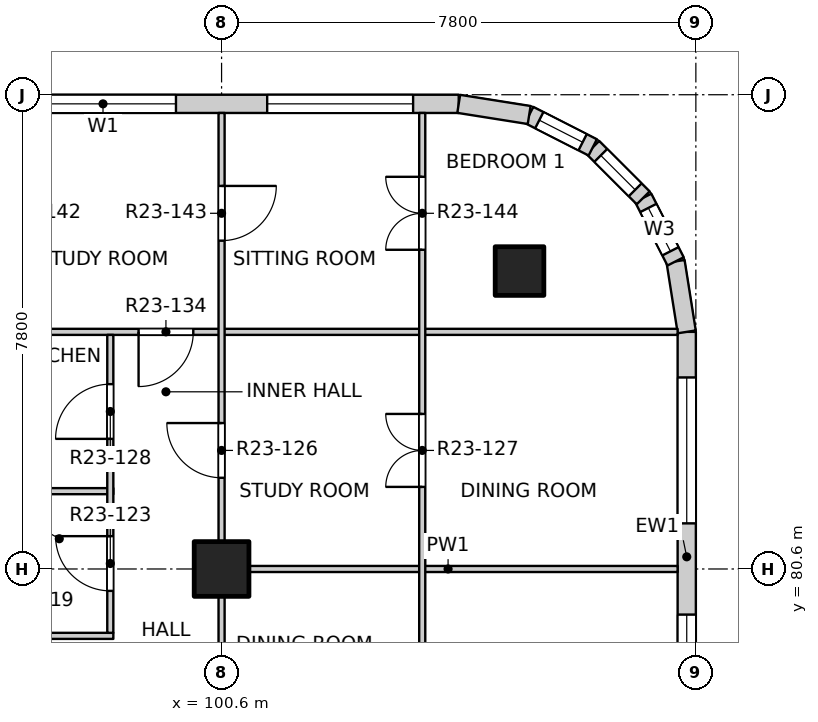
"""IFC4 building model, lengths in metres.
Left out: names, types, materials, properties, quantities, classifications, styles, units other than length and angle.
Written with IfcOpenShell. Run it as: python <this file> out.ifc"""

import sys

from ifc_helpers import new_model, si_unit, direction, frame, frame_2d, origin, origin_2d, place, context, subcontext, project, spatial, rectangle, extrude, element, fill, save


model = new_model("IFC4")
c1 = context("Model", 3, precision=1e-05, world=origin(), true_north=direction((0.0, 1.0)))
c2 = subcontext(c1, "Body", "Model", "MODEL_VIEW")
j1 = project(units=[si_unit("LENGTHUNIT", "METRE"), si_unit("PLANEANGLEUNIT", "RADIAN")], contexts=[c1])
p1 = place(None, origin())
s1 = spatial("IfcSite", under=j1, at=p1, CompositionType="ELEMENT")
p2 = place(p1, origin())
s2 = spatial("IfcBuilding", under=s1, at=p2, CompositionType="ELEMENT")
p3 = place(p2, frame((0.0, 0.0, 234.7)))
s3 = spatial("IfcBuildingStorey", under=s2, at=p3, CompositionType="ELEMENT", Elevation=234.7)
p4 = place(p3, frame((105.5, 85.5, -0.25), z_axis=(0.0, 0.0, 1.0), x_axis=(1.0, 0.0, 0.0)))
e1 = element("IfcColumn", 1, at=p4, inside=s3, PredefinedType="COLUMN", context=c2, shape_type="SweptSolid", body=[
    extrude(rectangle(XDim=0.8, YDim=0.8, at=origin_2d()), origin(), (0.0, 0.0, 1.0), 3.4),
])
p5 = place(p3, frame((100.6, 80.6, -0.25), z_axis=(0.0, 0.0, 1.0), x_axis=(1.0, 0.0, 0.0)))
e2 = element("IfcColumn", 2, at=p5, inside=s3, PredefinedType="COLUMN", context=c2, shape_type="SweptSolid", body=[
    extrude(rectangle(XDim=0.9, YDim=0.9, at=origin_2d()), origin(), (0.0, 0.0, 1.0), 3.4),
])
p6 = place(p3, frame((108.25, 77.1, 0.0), z_axis=(0.0, 0.0, 1.0), x_axis=(0.0, 1.0, 0.0)))
e3 = element("IfcWall", 3, at=p6, inside=s3, PredefinedType="SOLIDWALL", context=c2, shape_type="SweptSolid", body=[
    extrude(rectangle(XDim=7.4, YDim=0.3, at=frame_2d((3.7, 0.0))), origin(), (0.0, 0.0, 1.0), 2.7),
])
p7 = place(p6, frame((0.35, 0.0, 0.9)))
e4 = element("IfcOpeningElement", 4, at=p7, cuts=e3, PredefinedType="OPENING", context=c2, shape_type="SweptSolid", body=[
    extrude(rectangle(XDim=2.4, YDim=1.8, at=frame_2d((1.2, 0.9))), frame((0.0, 0.16, 0.0), z_axis=(0.0, -1.0, 0.0), x_axis=(1.0, 0.0, 0.0)), (0.0, 0.0, 1.0), 0.32),
])
p8 = place(p6, frame((4.25, 0.0, 0.9)))
e5 = element("IfcOpeningElement", 5, at=p8, cuts=e3, PredefinedType="OPENING", context=c2, shape_type="SweptSolid", body=[
    extrude(rectangle(XDim=2.4, YDim=1.8, at=frame_2d((1.2, 0.9))), frame((0.0, 0.16, 0.0), z_axis=(0.0, -1.0, 0.0), x_axis=(1.0, 0.0, 0.0)), (0.0, 0.0, 1.0), 0.32),
])
p9 = place(p3, frame((97.1, 88.25, 0.0), z_axis=(0.0, 0.0, 1.0), x_axis=(1.0, 0.0, 0.0)))
e6 = element("IfcWall", 6, at=p9, inside=s3, PredefinedType="SOLIDWALL", context=c2, shape_type="SweptSolid", body=[
    extrude(rectangle(XDim=7.4, YDim=0.3, at=frame_2d((3.7, 0.0))), origin(), (0.0, 0.0, 1.0), 2.7),
])
p10 = place(p9, frame((0.35, 0.0, 0.9)))
e7 = element("IfcOpeningElement", 7, at=p10, cuts=e6, PredefinedType="OPENING", context=c2, shape_type="SweptSolid", body=[
    extrude(rectangle(XDim=2.4, YDim=1.8, at=frame_2d((1.2, 0.9))), frame((0.0, 0.16, 0.0), z_axis=(0.0, -1.0, 0.0), x_axis=(1.0, 0.0, 0.0)), (0.0, 0.0, 1.0), 0.32),
])
p11 = place(p9, frame((4.25, 0.0, 0.9)))
e8 = element("IfcOpeningElement", 8, at=p11, cuts=e6, PredefinedType="OPENING", context=c2, shape_type="SweptSolid", body=[
    extrude(rectangle(XDim=2.4, YDim=1.8, at=frame_2d((1.2, 0.9))), frame((0.0, 0.16, 0.0), z_axis=(0.0, -1.0, 0.0), x_axis=(1.0, 0.0, 0.0)), (0.0, 0.0, 1.0), 0.32),
])
p12 = place(p3, frame((108.25, 84.5, 0.0), z_axis=(0.0, 0.0, 1.0), x_axis=(-0.156496880861, 0.987678452879, 0.0)))
e9 = element("IfcWall", 9, at=p12, inside=s3, PredefinedType="SOLIDWALL", context=c2, shape_type="SweptSolid", body=[
    extrude(rectangle(XDim=1.173, YDim=0.3, at=frame_2d((0.586, 0.0))), origin(), (0.0, 0.0, 1.0), 2.7),
])
p13 = place(p3, frame((108.066, 85.659, 0.0), z_axis=(0.0, 0.0, 1.0), x_axis=(-0.454025524128, 0.890988677504, 0.0)))
e10 = element("IfcWall", 10, at=p13, inside=s3, PredefinedType="SOLIDWALL", context=c2, shape_type="SweptSolid", body=[
    extrude(rectangle(XDim=1.173, YDim=0.3, at=frame_2d((0.587, 0.0))), origin(), (0.0, 0.0, 1.0), 2.7),
])
p14 = place(p13, frame((0.187, 0.0, 0.9)))
e11 = element("IfcOpeningElement", 11, at=p14, cuts=e10, PredefinedType="OPENING", context=c2, shape_type="SweptSolid", body=[
    extrude(rectangle(XDim=0.8, YDim=1.2, at=frame_2d((0.4, 0.6))), frame((0.0, 0.16, 0.0), z_axis=(0.0, -1.0, 0.0), x_axis=(1.0, 0.0, 0.0)), (0.0, 0.0, 1.0), 0.32),
])
p15 = place(p3, frame((107.534, 86.704, 0.0), z_axis=(0.0, 0.0, 1.0), x_axis=(-0.707106781187, 0.707106781187, 0.0)))
e12 = element("IfcWall", 12, at=p15, inside=s3, PredefinedType="SOLIDWALL", context=c2, shape_type="SweptSolid", body=[
    extrude(rectangle(XDim=1.173, YDim=0.3, at=frame_2d((0.586, 0.0))), origin(), (0.0, 0.0, 1.0), 2.7),
])
p16 = place(p15, frame((0.187, 0.0, 0.9)))
e13 = element("IfcOpeningElement", 13, at=p16, cuts=e12, PredefinedType="OPENING", context=c2, shape_type="SweptSolid", body=[
    extrude(rectangle(XDim=0.8, YDim=1.2, at=frame_2d((0.4, 0.6))), frame((0.0, 0.16, 0.0), z_axis=(0.0, -1.0, 0.0), x_axis=(1.0, 0.0, 0.0)), (0.0, 0.0, 1.0), 0.32),
])
p17 = place(p3, frame((106.704, 87.534, 0.0), z_axis=(0.0, 0.0, 1.0), x_axis=(-0.890988677504, 0.454025524128, 0.0)))
e14 = element("IfcWall", 14, at=p17, inside=s3, PredefinedType="SOLIDWALL", context=c2, shape_type="SweptSolid", body=[
    extrude(rectangle(XDim=1.173, YDim=0.3, at=frame_2d((0.587, 0.0))), origin(), (0.0, 0.0, 1.0), 2.7),
])
p18 = place(p17, frame((0.187, 0.0, 0.9)))
e15 = element("IfcOpeningElement", 15, at=p18, cuts=e14, PredefinedType="OPENING", context=c2, shape_type="SweptSolid", body=[
    extrude(rectangle(XDim=0.8, YDim=1.2, at=frame_2d((0.4, 0.6))), frame((0.0, 0.16, 0.0), z_axis=(0.0, -1.0, 0.0), x_axis=(1.0, 0.0, 0.0)), (0.0, 0.0, 1.0), 0.32),
])
p19 = place(p3, frame((105.659, 88.066, 0.0), z_axis=(0.0, 0.0, 1.0), x_axis=(-0.987678452879, 0.156496880861, 0.0)))
e16 = element("IfcWall", 16, at=p19, inside=s3, PredefinedType="SOLIDWALL", context=c2, shape_type="SweptSolid", body=[
    extrude(rectangle(XDim=1.173, YDim=0.3, at=frame_2d((0.586, 0.0))), origin(), (0.0, 0.0, 1.0), 2.7),
])
p20 = place(p3, frame((96.6, 79.5, 0.0), z_axis=(0.0, 0.0, 1.0), x_axis=(1.0, 0.0, 0.0)))
e17 = element("IfcWall", 17, at=p20, inside=s3, PredefinedType="PARTITIONING", context=c2, shape_type="SweptSolid", body=[
    extrude(rectangle(XDim=2.22, YDim=0.1, at=frame_2d((1.11, 0.0))), origin(), (0.0, 0.0, 1.0), 3.15),
])
p21 = place(p3, frame((100.55, 80.6, 0.0), z_axis=(0.0, 0.0, 1.0), x_axis=(1.0, 0.0, 0.0)))
e18 = element("IfcWall", 18, at=p21, inside=s3, PredefinedType="PARTITIONING", context=c2, shape_type="SweptSolid", body=[
    extrude(rectangle(XDim=7.55, YDim=0.1, at=frame_2d((3.775, 0.0))), origin(), (0.0, 0.0, 1.0), 3.15),
])
p22 = place(p3, frame((96.6, 81.88, 0.0), z_axis=(0.0, 0.0, 1.0), x_axis=(1.0, 0.0, 0.0)))
e19 = element("IfcWall", 19, at=p22, inside=s3, PredefinedType="PARTITIONING", context=c2, shape_type="SweptSolid", body=[
    extrude(rectangle(XDim=2.22, YDim=0.1, at=frame_2d((1.11, 0.0))), origin(), (0.0, 0.0, 1.0), 3.15),
])
p23 = place(p3, frame((96.6, 84.5, 0.0), z_axis=(0.0, 0.0, 1.0), x_axis=(1.0, 0.0, 0.0)))
e20 = element("IfcWall", 20, at=p23, inside=s3, PredefinedType="PARTITIONING", context=c2, shape_type="SweptSolid", body=[
    extrude(rectangle(XDim=11.5, YDim=0.1, at=frame_2d((5.75, 0.0))), origin(), (0.0, 0.0, 1.0), 3.15),
])
p24 = place(p23, frame((2.635, 0.0, 0.0)))
e21 = element("IfcOpeningElement", 21, at=p24, cuts=e20, PredefinedType="OPENING", context=c2, shape_type="SweptSolid", body=[
    extrude(rectangle(XDim=0.9, YDim=2.1, at=frame_2d((0.45, 1.05))), frame((0.0, 0.06, 0.0), z_axis=(0.0, -1.0, 0.0), x_axis=(1.0, 0.0, 0.0)), (0.0, 0.0, 1.0), 0.12),
])
p25 = place(p3, frame((98.77, 79.55, 0.0), z_axis=(0.0, 0.0, 1.0), x_axis=(0.0, 1.0, 0.0)))
e22 = element("IfcWall", 22, at=p25, inside=s3, PredefinedType="PARTITIONING", context=c2, shape_type="SweptSolid", body=[
    extrude(rectangle(XDim=4.9, YDim=0.1, at=frame_2d((2.45, 0.0))), origin(), (0.0, 0.0, 1.0), 3.15),
])
p26 = place(p25, frame((0.69, 0.0, 0.0)))
e23 = element("IfcOpeningElement", 23, at=p26, cuts=e22, PredefinedType="OPENING", context=c2, shape_type="SweptSolid", body=[
    extrude(rectangle(XDim=0.9, YDim=2.1, at=frame_2d((0.45, 1.05))), frame((0.0, 0.06, 0.0), z_axis=(0.0, -1.0, 0.0), x_axis=(1.0, 0.0, 0.0)), (0.0, 0.0, 1.0), 0.12),
])
p27 = place(p25, frame((3.19, 0.0, 0.0)))
e24 = element("IfcOpeningElement", 24, at=p27, cuts=e22, PredefinedType="OPENING", context=c2, shape_type="SweptSolid", body=[
    extrude(rectangle(XDim=0.9, YDim=2.1, at=frame_2d((0.45, 1.05))), frame((0.0, 0.06, 0.0), z_axis=(0.0, -1.0, 0.0), x_axis=(1.0, 0.0, 0.0)), (0.0, 0.0, 1.0), 0.12),
])
p28 = place(p3, frame((100.6, 41.9, 0.0), z_axis=(0.0, 0.0, 1.0), x_axis=(0.0, 1.0, 0.0)))
e25 = element("IfcWall", 25, at=p28, inside=s3, PredefinedType="PARTITIONING", context=c2, shape_type="SweptSolid", body=[
    extrude(rectangle(XDim=46.2, YDim=0.1, at=frame_2d((23.1, 0.0))), origin(), (0.0, 0.0, 1.0), 3.15),
])
p29 = place(p28, frame((1.2, 0.0, 0.0)))
e26 = element("IfcOpeningElement", 26, at=p29, cuts=e25, PredefinedType="OPENING", context=c2, shape_type="SweptSolid", body=[
    extrude(rectangle(XDim=0.9, YDim=2.1, at=frame_2d((0.45, 1.05))), frame((0.0, 0.06, 0.0), z_axis=(0.0, -1.0, 0.0), x_axis=(1.0, 0.0, 0.0)), (0.0, 0.0, 1.0), 0.12),
])
p30 = place(p28, frame((6.025, 0.0, 0.0)))
e27 = element("IfcOpeningElement", 27, at=p30, cuts=e25, PredefinedType="OPENING", context=c2, shape_type="SweptSolid", body=[
    extrude(rectangle(XDim=0.9, YDim=2.1, at=frame_2d((0.45, 1.05))), frame((0.0, 0.06, 0.0), z_axis=(0.0, -1.0, 0.0), x_axis=(1.0, 0.0, 0.0)), (0.0, 0.0, 1.0), 0.12),
])
p31 = place(p28, frame((9.975, 0.0, 0.0)))
e28 = element("IfcOpeningElement", 28, at=p31, cuts=e25, PredefinedType="OPENING", context=c2, shape_type="SweptSolid", body=[
    extrude(rectangle(XDim=0.9, YDim=2.1, at=frame_2d((0.45, 1.05))), frame((0.0, 0.06, 0.0), z_axis=(0.0, -1.0, 0.0), x_axis=(1.0, 0.0, 0.0)), (0.0, 0.0, 1.0), 0.12),
])
p32 = place(p28, frame((12.9, 0.0, 0.0)))
e29 = element("IfcOpeningElement", 29, at=p32, cuts=e25, PredefinedType="OPENING", context=c2, shape_type="SweptSolid", body=[
    extrude(rectangle(XDim=0.9, YDim=2.1, at=frame_2d((0.45, 1.05))), frame((0.0, 0.06, 0.0), z_axis=(0.0, -1.0, 0.0), x_axis=(1.0, 0.0, 0.0)), (0.0, 0.0, 1.0), 0.12),
])
p33 = place(p28, frame((17.775, 0.0, 0.0)))
e30 = element("IfcOpeningElement", 30, at=p33, cuts=e25, PredefinedType="OPENING", context=c2, shape_type="SweptSolid", body=[
    extrude(rectangle(XDim=0.9, YDim=2.1, at=frame_2d((0.45, 1.05))), frame((0.0, 0.06, 0.0), z_axis=(0.0, -1.0, 0.0), x_axis=(1.0, 0.0, 0.0)), (0.0, 0.0, 1.0), 0.12),
])
p34 = place(p28, frame((21.625, 0.0, 0.0)))
e31 = element("IfcOpeningElement", 31, at=p34, cuts=e25, PredefinedType="OPENING", context=c2, shape_type="SweptSolid", body=[
    extrude(rectangle(XDim=0.9, YDim=2.1, at=frame_2d((0.45, 1.05))), frame((0.0, 0.06, 0.0), z_axis=(0.0, -1.0, 0.0), x_axis=(1.0, 0.0, 0.0)), (0.0, 0.0, 1.0), 0.12),
])
p35 = place(p28, frame((25.575, 0.0, 0.0)))
e32 = element("IfcOpeningElement", 32, at=p35, cuts=e25, PredefinedType="OPENING", context=c2, shape_type="SweptSolid", body=[
    extrude(rectangle(XDim=0.9, YDim=2.1, at=frame_2d((0.45, 1.05))), frame((0.0, 0.06, 0.0), z_axis=(0.0, -1.0, 0.0), x_axis=(1.0, 0.0, 0.0)), (0.0, 0.0, 1.0), 0.12),
])
p36 = place(p28, frame((28.5, 0.0, 0.0)))
e33 = element("IfcOpeningElement", 33, at=p36, cuts=e25, PredefinedType="OPENING", context=c2, shape_type="SweptSolid", body=[
    extrude(rectangle(XDim=0.9, YDim=2.1, at=frame_2d((0.45, 1.05))), frame((0.0, 0.06, 0.0), z_axis=(0.0, -1.0, 0.0), x_axis=(1.0, 0.0, 0.0)), (0.0, 0.0, 1.0), 0.12),
])
p37 = place(p28, frame((33.375, 0.0, 0.0)))
e34 = element("IfcOpeningElement", 34, at=p37, cuts=e25, PredefinedType="OPENING", context=c2, shape_type="SweptSolid", body=[
    extrude(rectangle(XDim=0.9, YDim=2.1, at=frame_2d((0.45, 1.05))), frame((0.0, 0.06, 0.0), z_axis=(0.0, -1.0, 0.0), x_axis=(1.0, 0.0, 0.0)), (0.0, 0.0, 1.0), 0.12),
])
p38 = place(p28, frame((36.3, 0.0, 0.0)))
e35 = element("IfcOpeningElement", 35, at=p38, cuts=e25, PredefinedType="OPENING", context=c2, shape_type="SweptSolid", body=[
    extrude(rectangle(XDim=0.9, YDim=2.1, at=frame_2d((0.45, 1.05))), frame((0.0, 0.06, 0.0), z_axis=(0.0, -1.0, 0.0), x_axis=(1.0, 0.0, 0.0)), (0.0, 0.0, 1.0), 0.12),
])
p39 = place(p28, frame((40.2, 0.0, 0.0)))
e36 = element("IfcOpeningElement", 36, at=p39, cuts=e25, PredefinedType="OPENING", context=c2, shape_type="SweptSolid", body=[
    extrude(rectangle(XDim=0.9, YDim=2.1, at=frame_2d((0.45, 1.05))), frame((0.0, 0.06, 0.0), z_axis=(0.0, -1.0, 0.0), x_axis=(1.0, 0.0, 0.0)), (0.0, 0.0, 1.0), 0.12),
])
p40 = place(p28, frame((44.1, 0.0, 0.0)))
e37 = element("IfcOpeningElement", 37, at=p40, cuts=e25, PredefinedType="OPENING", context=c2, shape_type="SweptSolid", body=[
    extrude(rectangle(XDim=0.9, YDim=2.1, at=frame_2d((0.45, 1.05))), frame((0.0, 0.06, 0.0), z_axis=(0.0, -1.0, 0.0), x_axis=(1.0, 0.0, 0.0)), (0.0, 0.0, 1.0), 0.12),
])
p41 = place(p3, frame((103.9, 61.2, 0.0), z_axis=(0.0, 0.0, 1.0), x_axis=(0.0, 1.0, 0.0)))
e38 = element("IfcWall", 38, at=p41, inside=s3, PredefinedType="PARTITIONING", context=c2, shape_type="SweptSolid", body=[
    extrude(rectangle(XDim=26.9, YDim=0.1, at=frame_2d((13.45, 0.0))), origin(), (0.0, 0.0, 1.0), 3.15),
])
p42 = place(p41, frame((0.425, 0.0, 0.0)))
e39 = element("IfcOpeningElement", 39, at=p42, cuts=e38, PredefinedType="OPENING", context=c2, shape_type="SweptSolid", body=[
    extrude(rectangle(XDim=0.9, YDim=2.1, at=frame_2d((0.45, 1.05))), frame((0.0, 0.06, 0.0), z_axis=(0.0, -1.0, 0.0), x_axis=(1.0, 0.0, 0.0)), (0.0, 0.0, 1.0), 0.12),
])
p43 = place(p41, frame((2.375, 0.0, 0.0)))
e40 = element("IfcOpeningElement", 40, at=p43, cuts=e38, PredefinedType="OPENING", context=c2, shape_type="SweptSolid", body=[
    extrude(rectangle(XDim=0.9, YDim=2.1, at=frame_2d((0.45, 1.05))), frame((0.0, 0.06, 0.0), z_axis=(0.0, -1.0, 0.0), x_axis=(1.0, 0.0, 0.0)), (0.0, 0.0, 1.0), 0.12),
])
p44 = place(p41, frame((4.325, 0.0, 0.0)))
e41 = element("IfcOpeningElement", 41, at=p44, cuts=e38, PredefinedType="OPENING", context=c2, shape_type="SweptSolid", body=[
    extrude(rectangle(XDim=0.9, YDim=2.1, at=frame_2d((0.45, 1.05))), frame((0.0, 0.06, 0.0), z_axis=(0.0, -1.0, 0.0), x_axis=(1.0, 0.0, 0.0)), (0.0, 0.0, 1.0), 0.12),
])
p45 = place(p41, frame((6.275, 0.0, 0.0)))
e42 = element("IfcOpeningElement", 42, at=p45, cuts=e38, PredefinedType="OPENING", context=c2, shape_type="SweptSolid", body=[
    extrude(rectangle(XDim=0.9, YDim=2.1, at=frame_2d((0.45, 1.05))), frame((0.0, 0.06, 0.0), z_axis=(0.0, -1.0, 0.0), x_axis=(1.0, 0.0, 0.0)), (0.0, 0.0, 1.0), 0.12),
])
p46 = place(p41, frame((9.05, 0.0, 0.0)))
e43 = element("IfcOpeningElement", 43, at=p46, cuts=e38, PredefinedType="OPENING", context=c2, shape_type="SweptSolid", body=[
    extrude(rectangle(XDim=1.2, YDim=2.1, at=frame_2d((0.6, 1.05))), frame((0.0, 0.06, 0.0), z_axis=(0.0, -1.0, 0.0), x_axis=(1.0, 0.0, 0.0)), (0.0, 0.0, 1.0), 0.12),
])
p47 = place(p41, frame((12.125, 0.0, 0.0)))
e44 = element("IfcOpeningElement", 44, at=p47, cuts=e38, PredefinedType="OPENING", context=c2, shape_type="SweptSolid", body=[
    extrude(rectangle(XDim=0.9, YDim=2.1, at=frame_2d((0.45, 1.05))), frame((0.0, 0.06, 0.0), z_axis=(0.0, -1.0, 0.0), x_axis=(1.0, 0.0, 0.0)), (0.0, 0.0, 1.0), 0.12),
])
p48 = place(p41, frame((14.075, 0.0, 0.0)))
e45 = element("IfcOpeningElement", 45, at=p48, cuts=e38, PredefinedType="OPENING", context=c2, shape_type="SweptSolid", body=[
    extrude(rectangle(XDim=0.9, YDim=2.1, at=frame_2d((0.45, 1.05))), frame((0.0, 0.06, 0.0), z_axis=(0.0, -1.0, 0.0), x_axis=(1.0, 0.0, 0.0)), (0.0, 0.0, 1.0), 0.12),
])
p49 = place(p41, frame((16.85, 0.0, 0.0)))
e46 = element("IfcOpeningElement", 46, at=p49, cuts=e38, PredefinedType="OPENING", context=c2, shape_type="SweptSolid", body=[
    extrude(rectangle(XDim=1.2, YDim=2.1, at=frame_2d((0.6, 1.05))), frame((0.0, 0.06, 0.0), z_axis=(0.0, -1.0, 0.0), x_axis=(1.0, 0.0, 0.0)), (0.0, 0.0, 1.0), 0.12),
])
p50 = place(p41, frame((20.75, 0.0, 0.0)))
e47 = element("IfcOpeningElement", 47, at=p50, cuts=e38, PredefinedType="OPENING", context=c2, shape_type="SweptSolid", body=[
    extrude(rectangle(XDim=1.2, YDim=2.1, at=frame_2d((0.6, 1.05))), frame((0.0, 0.06, 0.0), z_axis=(0.0, -1.0, 0.0), x_axis=(1.0, 0.0, 0.0)), (0.0, 0.0, 1.0), 0.12),
])
p51 = place(p41, frame((24.65, 0.0, 0.0)))
e48 = element("IfcOpeningElement", 48, at=p51, cuts=e38, PredefinedType="OPENING", context=c2, shape_type="SweptSolid", body=[
    extrude(rectangle(XDim=1.2, YDim=2.1, at=frame_2d((0.6, 1.05))), frame((0.0, 0.06, 0.0), z_axis=(0.0, -1.0, 0.0), x_axis=(1.0, 0.0, 0.0)), (0.0, 0.0, 1.0), 0.12),
])
p52 = place(p7, origin())
e49 = element("IfcWindow", 49, at=p52, inside=s3, PartitioningType="DOUBLE_PANEL_VERTICAL", PredefinedType="WINDOW", context=c2, shape_type="SweptSolid", body=[
    extrude(rectangle(XDim=2.4, YDim=1.8, at=frame_2d((1.2, 0.9))), frame((0.0, 0.03, 0.0), z_axis=(0.0, -1.0, 0.0), x_axis=(1.0, 0.0, 0.0)), (0.0, 0.0, 1.0), 0.06),
])
fill(e4, e49)
p53 = place(p8, origin())
e50 = element("IfcWindow", 50, at=p53, inside=s3, PartitioningType="DOUBLE_PANEL_VERTICAL", PredefinedType="WINDOW", context=c2, shape_type="SweptSolid", body=[
    extrude(rectangle(XDim=2.4, YDim=1.8, at=frame_2d((1.2, 0.9))), frame((0.0, 0.03, 0.0), z_axis=(0.0, -1.0, 0.0), x_axis=(1.0, 0.0, 0.0)), (0.0, 0.0, 1.0), 0.06),
])
fill(e5, e50)
p54 = place(p10, origin())
e51 = element("IfcWindow", 51, at=p54, inside=s3, PartitioningType="DOUBLE_PANEL_VERTICAL", PredefinedType="WINDOW", context=c2, shape_type="SweptSolid", body=[
    extrude(rectangle(XDim=2.4, YDim=1.8, at=frame_2d((1.2, 0.9))), frame((0.0, 0.03, 0.0), z_axis=(0.0, -1.0, 0.0), x_axis=(1.0, 0.0, 0.0)), (0.0, 0.0, 1.0), 0.06),
])
fill(e7, e51)
p55 = place(p11, origin())
e52 = element("IfcWindow", 52, at=p55, inside=s3, PartitioningType="DOUBLE_PANEL_VERTICAL", PredefinedType="WINDOW", context=c2, shape_type="SweptSolid", body=[
    extrude(rectangle(XDim=2.4, YDim=1.8, at=frame_2d((1.2, 0.9))), frame((0.0, 0.03, 0.0), z_axis=(0.0, -1.0, 0.0), x_axis=(1.0, 0.0, 0.0)), (0.0, 0.0, 1.0), 0.06),
])
fill(e8, e52)
p56 = place(p14, origin())
e53 = element("IfcWindow", 53, at=p56, inside=s3, PartitioningType="SINGLE_PANEL", PredefinedType="WINDOW", context=c2, shape_type="SweptSolid", body=[
    extrude(rectangle(XDim=0.8, YDim=1.2, at=frame_2d((0.4, 0.6))), frame((0.0, 0.03, 0.0), z_axis=(0.0, -1.0, 0.0), x_axis=(1.0, 0.0, 0.0)), (0.0, 0.0, 1.0), 0.06),
])
fill(e11, e53)
p57 = place(p16, origin())
e54 = element("IfcWindow", 54, at=p57, inside=s3, PartitioningType="SINGLE_PANEL", PredefinedType="WINDOW", context=c2, shape_type="SweptSolid", body=[
    extrude(rectangle(XDim=0.8, YDim=1.2, at=frame_2d((0.4, 0.6))), frame((0.0, 0.03, 0.0), z_axis=(0.0, -1.0, 0.0), x_axis=(1.0, 0.0, 0.0)), (0.0, 0.0, 1.0), 0.06),
])
fill(e13, e54)
p58 = place(p18, origin())
e55 = element("IfcWindow", 55, at=p58, inside=s3, PartitioningType="SINGLE_PANEL", PredefinedType="WINDOW", context=c2, shape_type="SweptSolid", body=[
    extrude(rectangle(XDim=0.8, YDim=1.2, at=frame_2d((0.4, 0.6))), frame((0.0, 0.03, 0.0), z_axis=(0.0, -1.0, 0.0), x_axis=(1.0, 0.0, 0.0)), (0.0, 0.0, 1.0), 0.06),
])
fill(e15, e55)
p59 = place(p26, origin())
e56 = element("IfcDoor", 56, at=p59, inside=s3, OperationType="SINGLE_SWING_RIGHT", PredefinedType="DOOR", context=c2, shape_type="SweptSolid", body=[
    extrude(rectangle(XDim=0.9, YDim=2.1, at=frame_2d((0.45, 1.05))), frame((0.0, 0.025, 0.0), z_axis=(0.0, -1.0, 0.0), x_axis=(1.0, 0.0, 0.0)), (0.0, 0.0, 1.0), 0.05),
])
fill(e23, e56)
p60 = place(p39, origin())
e57 = element("IfcDoor", 57, at=p60, inside=s3, OperationType="SINGLE_SWING_RIGHT", PredefinedType="DOOR", context=c2, shape_type="SweptSolid", body=[
    extrude(rectangle(XDim=0.9, YDim=2.1, at=frame_2d((0.45, 1.05))), frame((0.0, 0.025, 0.0), z_axis=(0.0, -1.0, 0.0), x_axis=(1.0, 0.0, 0.0)), (0.0, 0.0, 1.0), 0.05),
])
fill(e36, e57)
p61 = place(p50, origin())
e58 = element("IfcDoor", 58, at=p61, inside=s3, OperationType="DOUBLE_DOOR_SINGLE_SWING", PredefinedType="DOOR", context=c2, shape_type="SweptSolid", body=[
    extrude(rectangle(XDim=1.2, YDim=2.1, at=frame_2d((0.6, 1.05))), frame((0.0, 0.025, 0.0), z_axis=(0.0, -1.0, 0.0), x_axis=(1.0, 0.0, 0.0)), (0.0, 0.0, 1.0), 0.05),
])
fill(e47, e58)
p62 = place(p27, origin())
e59 = element("IfcDoor", 59, at=p62, inside=s3, OperationType="SINGLE_SWING_LEFT", PredefinedType="DOOR", context=c2, shape_type="SweptSolid", body=[
    extrude(rectangle(XDim=0.9, YDim=2.1, at=frame_2d((0.45, 1.05))), frame((0.0, 0.025, 0.0), z_axis=(0.0, -1.0, 0.0), x_axis=(1.0, 0.0, 0.0)), (0.0, 0.0, 1.0), 0.05),
])
fill(e24, e59)
p63 = place(p24, origin())
e60 = element("IfcDoor", 60, at=p63, inside=s3, OperationType="SINGLE_SWING_RIGHT", PredefinedType="DOOR", context=c2, shape_type="SweptSolid", body=[
    extrude(rectangle(XDim=0.9, YDim=2.1, at=frame_2d((0.45, 1.05))), frame((0.0, 0.025, 0.0), z_axis=(0.0, -1.0, 0.0), x_axis=(1.0, 0.0, 0.0)), (0.0, 0.0, 1.0), 0.05),
])
fill(e21, e60)
p64 = place(p40, origin())
e61 = element("IfcDoor", 61, at=p64, inside=s3, OperationType="SINGLE_SWING_LEFT", PredefinedType="DOOR", context=c2, shape_type="SweptSolid", body=[
    extrude(rectangle(XDim=0.9, YDim=2.1, at=frame_2d((0.45, 1.05))), frame((0.0, 0.025, 0.0), z_axis=(0.0, -1.0, 0.0), x_axis=(1.0, 0.0, 0.0)), (0.0, 0.0, 1.0), 0.05),
])
fill(e37, e61)
p65 = place(p51, origin())
e62 = element("IfcDoor", 62, at=p65, inside=s3, OperationType="DOUBLE_DOOR_SINGLE_SWING", PredefinedType="DOOR", context=c2, shape_type="SweptSolid", body=[
    extrude(rectangle(XDim=1.2, YDim=2.1, at=frame_2d((0.6, 1.05))), frame((0.0, 0.025, 0.0), z_axis=(0.0, -1.0, 0.0), x_axis=(1.0, 0.0, 0.0)), (0.0, 0.0, 1.0), 0.05),
])
fill(e48, e62)
save(model, sys.argv[1])
